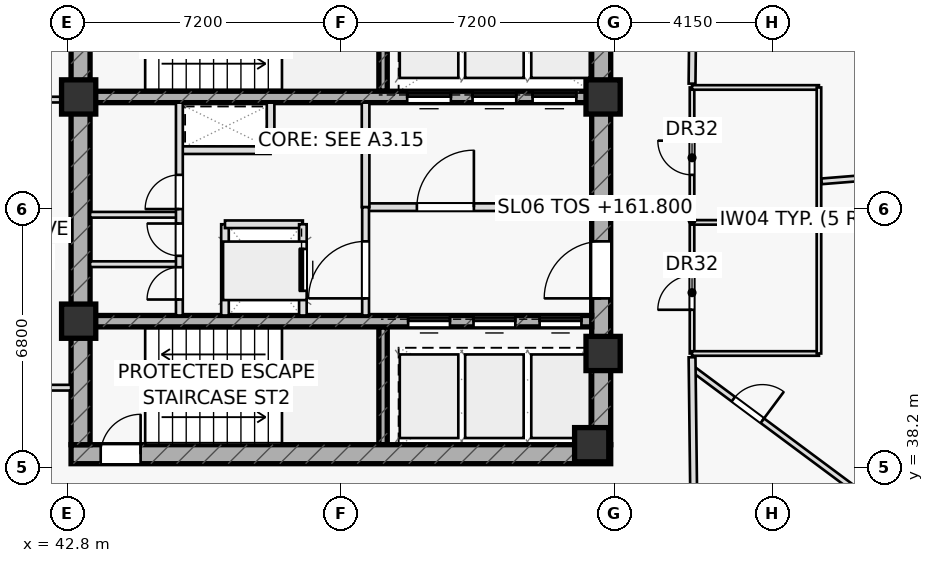
"""IFC4 building model, lengths in metres.
Left out: names, types, materials, properties, quantities, classifications, styles, units other than length and angle.
Written with IfcOpenShell. Run it as: python <this file> out.ifc"""

import sys

from ifc_helpers import new_model, si_unit, direction, frame, frame_2d, origin, origin_2d, place, context, subcontext, project, spatial, rectangle, extrude, element, fill, save


model = new_model("IFC4")
c1 = context("Model", 3, precision=1e-05, world=origin(), true_north=direction((0.0, 1.0)))
c2 = subcontext(c1, "Body", "Model", "MODEL_VIEW")
j1 = project(units=[si_unit("LENGTHUNIT", "METRE"), si_unit("PLANEANGLEUNIT", "RADIAN")], contexts=[c1])
p1 = place(None, origin())
s1 = spatial("IfcSite", under=j1, at=p1, CompositionType="ELEMENT")
p2 = place(p1, origin())
s2 = spatial("IfcBuilding", under=s1, at=p2, CompositionType="ELEMENT")
p3 = place(p2, frame((0.0, 0.0, 161.8)))
s3 = spatial("IfcBuildingStorey", under=s2, at=p3, CompositionType="ELEMENT", Elevation=161.8)
for number, where, z_axis, x_axis in (
    (1, (51.11, 48.1, 0.0), (0.0, 0.0, 1.0), (0.0, 1.0, 0.0)),
    (2, (51.11, 38.8, 0.0), (0.0, 0.0, 1.0), (0.0, 1.0, 0.0)),
):
    element("IfcWall", number, at=place(p3, frame(where, z_axis=z_axis, x_axis=x_axis)), inside=s3, PredefinedType="SHEAR", context=c2, shape_type="SweptSolid", body=[
        extrude(rectangle(XDim=3.1, YDim=0.22, at=frame_2d((1.55, 0.0))), origin(), (0.0, 0.0, 1.0), 3.55),
    ])
p4 = place(p3, frame((42.9, 38.55, 0.0), z_axis=(0.0, 0.0, 1.0), x_axis=(1.0, 0.0, 0.0)))
e3 = element("IfcWall", 3, at=p4, inside=s3, PredefinedType="SHEAR", context=c2, shape_type="SweptSolid", body=[
    extrude(rectangle(XDim=14.2, YDim=0.5, at=frame_2d((7.1, 0.0))), origin(), (0.0, 0.0, 1.0), 3.55),
])
p5 = place(p4, frame((0.78, 0.0, 0.0)))
e4 = element("IfcOpeningElement", 4, at=p5, cuts=e3, PredefinedType="OPENING", context=c2, shape_type="SweptSolid", body=[
    extrude(rectangle(XDim=1.05, YDim=2.2, at=frame_2d((0.525, 1.1))), frame((0.0, 0.26, 0.0), z_axis=(0.0, -1.0, 0.0), x_axis=(1.0, 0.0, 0.0)), (0.0, 0.0, 1.0), 0.52),
])
p6 = place(p3, frame((43.15, 38.8, 0.0), z_axis=(0.0, 0.0, 1.0), x_axis=(0.0, 1.0, 0.0)))
e5 = element("IfcWall", 5, at=p6, inside=s3, PredefinedType="SHEAR", context=c2, shape_type="SweptSolid", body=[
    extrude(rectangle(XDim=12.4, YDim=0.5, at=frame_2d((6.2, 0.0))), origin(), (0.0, 0.0, 1.0), 3.55),
])
p7 = place(p3, frame((56.85, 38.8, 0.0), z_axis=(0.0, 0.0, 1.0), x_axis=(0.0, 1.0, 0.0)))
e6 = element("IfcWall", 6, at=p7, inside=s3, PredefinedType="SHEAR", context=c2, shape_type="SweptSolid", body=[
    extrude(rectangle(XDim=12.4, YDim=0.5, at=frame_2d((6.2, 0.0))), origin(), (0.0, 0.0, 1.0), 3.55),
])
p8 = place(p7, frame((3.85, 0.0, 0.0)))
e7 = element("IfcOpeningElement", 7, at=p8, cuts=e6, PredefinedType="OPENING", context=c2, shape_type="SweptSolid", body=[
    extrude(rectangle(XDim=1.5, YDim=2.2, at=frame_2d((0.75, 1.1))), frame((0.0, 0.26, 0.0), z_axis=(0.0, -1.0, 0.0), x_axis=(1.0, 0.0, 0.0)), (0.0, 0.0, 1.0), 0.52),
])
p9 = place(p3, frame((43.4, 47.95, 0.0), z_axis=(0.0, 0.0, 1.0), x_axis=(1.0, 0.0, 0.0)))
e8 = element("IfcWall", 8, at=p9, inside=s3, PredefinedType="SHEAR", context=c2, shape_type="SweptSolid", body=[
    extrude(rectangle(XDim=13.2, YDim=0.3, at=frame_2d((6.6, 0.0))), origin(), (0.0, 0.0, 1.0), 3.55),
])
p10 = place(p9, frame((8.345, 0.0, 0.0)))
e9 = element("IfcOpeningElement", 9, at=p10, cuts=e8, PredefinedType="OPENING", context=c2, shape_type="SweptSolid", body=[
    extrude(rectangle(XDim=1.15, YDim=2.2, at=frame_2d((0.575, 1.1))), frame((0.0, 0.16, 0.0), z_axis=(0.0, -1.0, 0.0), x_axis=(1.0, 0.0, 0.0)), (0.0, 0.0, 1.0), 0.32),
])
p11 = place(p9, frame((10.065, 0.0, 0.0)))
e10 = element("IfcOpeningElement", 10, at=p11, cuts=e8, PredefinedType="OPENING", context=c2, shape_type="SweptSolid", body=[
    extrude(rectangle(XDim=1.15, YDim=2.2, at=frame_2d((0.575, 1.1))), frame((0.0, 0.16, 0.0), z_axis=(0.0, -1.0, 0.0), x_axis=(1.0, 0.0, 0.0)), (0.0, 0.0, 1.0), 0.32),
])
p12 = place(p9, frame((11.645, 0.0, 0.0)))
e11 = element("IfcOpeningElement", 11, at=p12, cuts=e8, PredefinedType="OPENING", context=c2, shape_type="SweptSolid", body=[
    extrude(rectangle(XDim=1.15, YDim=2.2, at=frame_2d((0.575, 1.1))), frame((0.0, 0.16, 0.0), z_axis=(0.0, -1.0, 0.0), x_axis=(1.0, 0.0, 0.0)), (0.0, 0.0, 1.0), 0.32),
])
p13 = place(p3, frame((43.4, 42.05, 0.0), z_axis=(0.0, 0.0, 1.0), x_axis=(1.0, 0.0, 0.0)))
e12 = element("IfcWall", 12, at=p13, inside=s3, PredefinedType="SHEAR", context=c2, shape_type="SweptSolid", body=[
    extrude(rectangle(XDim=13.2, YDim=0.3, at=frame_2d((6.6, 0.0))), origin(), (0.0, 0.0, 1.0), 3.55),
])
p14 = place(p13, frame((8.37, 0.0, 0.0)))
e13 = element("IfcOpeningElement", 13, at=p14, cuts=e12, PredefinedType="OPENING", context=c2, shape_type="SweptSolid", body=[
    extrude(rectangle(XDim=1.1, YDim=2.15, at=frame_2d((0.55, 1.075))), frame((0.0, 0.16, 0.0), z_axis=(0.0, -1.0, 0.0), x_axis=(1.0, 0.0, 0.0)), (0.0, 0.0, 1.0), 0.32),
])
p15 = place(p13, frame((10.09, 0.0, 0.0)))
e14 = element("IfcOpeningElement", 14, at=p15, cuts=e12, PredefinedType="OPENING", context=c2, shape_type="SweptSolid", body=[
    extrude(rectangle(XDim=1.1, YDim=2.15, at=frame_2d((0.55, 1.075))), frame((0.0, 0.16, 0.0), z_axis=(0.0, -1.0, 0.0), x_axis=(1.0, 0.0, 0.0)), (0.0, 0.0, 1.0), 0.32),
])
p16 = place(p13, frame((11.83, 0.0, 0.0)))
e15 = element("IfcOpeningElement", 15, at=p16, cuts=e12, PredefinedType="OPENING", context=c2, shape_type="SweptSolid", body=[
    extrude(rectangle(XDim=1.1, YDim=2.15, at=frame_2d((0.55, 1.075))), frame((0.0, 0.16, 0.0), z_axis=(0.0, -1.0, 0.0), x_axis=(1.0, 0.0, 0.0)), (0.0, 0.0, 1.0), 0.32),
])
for number, where, z_axis, x_axis in (
    (16, (43.1, 47.95, 0.0), (0.0, 0.0, 1.0), (1.0, 0.0, 0.0)),
    (17, (56.9, 47.95, 0.0), (0.0, 0.0, 1.0), (1.0, 0.0, 0.0)),
    (18, (43.1, 42.05, 0.0), (0.0, 0.0, 1.0), (1.0, 0.0, 0.0)),
    (19, (56.9, 41.2, 0.0), (0.0, 0.0, 1.0), (1.0, 0.0, 0.0)),
    (20, (56.6, 38.8, 0.0), (0.0, 0.0, 1.0), (1.0, 0.0, 0.0)),
):
    element("IfcColumn", number, at=place(p3, frame(where, z_axis=z_axis, x_axis=x_axis)), inside=s3, PredefinedType="COLUMN", context=c2, shape_type="SweptSolid", body=[
        extrude(rectangle(XDim=0.9, YDim=0.9, at=origin_2d()), origin(), (0.0, 0.0, 1.0), 3.55),
    ])
p17 = place(p3, frame((45.75, 46.55, 0.0), z_axis=(0.0, 0.0, 1.0), x_axis=(1.0, 0.0, 0.0)))
e21 = element("IfcWall", 21, at=p17, inside=s3, PredefinedType="PARTITIONING", context=c2, shape_type="SweptSolid", body=[
    extrude(rectangle(XDim=2.4, YDim=0.2, at=frame_2d((1.2, 0.0))), origin(), (0.0, 0.0, 1.0), 3.55),
])
p18 = place(p3, frame((48.15, 46.55, 0.0), z_axis=(0.0, 0.0, 1.0), x_axis=(0.0, 1.0, 0.0)))
e22 = element("IfcWall", 22, at=p18, inside=s3, PredefinedType="PARTITIONING", context=c2, shape_type="SweptSolid", body=[
    extrude(rectangle(XDim=1.25, YDim=0.2, at=frame_2d((0.625, 0.0))), origin(), (0.0, 0.0, 1.0), 3.55),
])
p19 = place(p3, frame((46.95, 42.2, 0.0), z_axis=(0.0, 0.0, 1.0), x_axis=(0.0, 1.0, 0.0)))
e23 = element("IfcWall", 23, at=p19, inside=s3, PredefinedType="PARTITIONING", context=c2, shape_type="SweptSolid", body=[
    extrude(rectangle(XDim=2.4, YDim=0.2, at=frame_2d((1.2, 0.0))), origin(), (0.0, 0.0, 1.0), 3.55),
])
p20 = place(p3, frame((46.95, 44.6, 0.0), z_axis=(0.0, 0.0, 1.0), x_axis=(1.0, 0.0, 0.0)))
e24 = element("IfcWall", 24, at=p20, inside=s3, PredefinedType="PARTITIONING", context=c2, shape_type="SweptSolid", body=[
    extrude(rectangle(XDim=2.05, YDim=0.2, at=frame_2d((1.025, 0.0))), origin(), (0.0, 0.0, 1.0), 3.55),
])
p21 = place(p3, frame((50.65, 45.05, 0.0), z_axis=(0.0, 0.0, 1.0), x_axis=(1.0, 0.0, 0.0)))
e25 = element("IfcWall", 25, at=p21, inside=s3, PredefinedType="PARTITIONING", context=c2, shape_type="SweptSolid", body=[
    extrude(rectangle(XDim=5.95, YDim=0.2, at=frame_2d((2.975, 0.0))), origin(), (0.0, 0.0, 1.0), 3.55),
])
p22 = place(p21, frame((1.35, 0.0, 0.0)))
e26 = element("IfcOpeningElement", 26, at=p22, cuts=e25, PredefinedType="OPENING", context=c2, shape_type="SweptSolid", body=[
    extrude(rectangle(XDim=1.5, YDim=2.2, at=frame_2d((0.75, 1.1))), frame((0.0, 0.11, 0.0), z_axis=(0.0, -1.0, 0.0), x_axis=(1.0, 0.0, 0.0)), (0.0, 0.0, 1.0), 0.22),
])
p23 = place(p3, frame((50.65, 45.05, 0.0), z_axis=(0.0, 0.0, 1.0), x_axis=(0.0, 1.0, 0.0)))
e27 = element("IfcWall", 27, at=p23, inside=s3, PredefinedType="PARTITIONING", context=c2, shape_type="SweptSolid", body=[
    extrude(rectangle(XDim=2.75, YDim=0.2, at=frame_2d((1.375, 0.0))), origin(), (0.0, 0.0, 1.0), 3.55),
])
p24 = place(p3, frame((50.65, 42.2, 0.0), z_axis=(0.0, 0.0, 1.0), x_axis=(0.0, 1.0, 0.0)))
e28 = element("IfcWall", 28, at=p24, inside=s3, PredefinedType="PARTITIONING", context=c2, shape_type="SweptSolid", body=[
    extrude(rectangle(XDim=2.85, YDim=0.18, at=frame_2d((1.425, 0.0))), origin(), (0.0, 0.0, 1.0), 3.55),
])
p25 = place(p24, frame((0.45, 0.0, 0.0)))
e29 = element("IfcOpeningElement", 29, at=p25, cuts=e28, PredefinedType="OPENING", context=c2, shape_type="SweptSolid", body=[
    extrude(rectangle(XDim=1.5, YDim=2.2, at=frame_2d((0.75, 1.1))), frame((0.0, 0.1, 0.0), z_axis=(0.0, -1.0, 0.0), x_axis=(1.0, 0.0, 0.0)), (0.0, 0.0, 1.0), 0.2),
])
for number, where, z_axis, x_axis in (
    (30, (43.4, 43.55, 0.0), (0.0, 0.0, 1.0), (1.0, 0.0, 0.0)),
    (31, (43.4, 44.85, 0.0), (0.0, 0.0, 1.0), (1.0, 0.0, 0.0)),
):
    element("IfcWall", number, at=place(p3, frame(where, z_axis=z_axis, x_axis=x_axis)), inside=s3, PredefinedType="PARTITIONING", context=c2, shape_type="SweptSolid", body=[
        extrude(rectangle(XDim=2.35, YDim=0.15, at=frame_2d((1.175, 0.0))), origin(), (0.0, 0.0, 1.0), 3.55),
    ])
p26 = place(p3, frame((45.75, 42.2, 0.0), z_axis=(0.0, 0.0, 1.0), x_axis=(0.0, 1.0, 0.0)))
e32 = element("IfcWall", 32, at=p26, inside=s3, PredefinedType="PARTITIONING", context=c2, shape_type="SweptSolid", body=[
    extrude(rectangle(XDim=5.6, YDim=0.18, at=frame_2d((2.8, 0.0))), origin(), (0.0, 0.0, 1.0), 3.55),
])
p27 = place(p26, frame((0.42, 0.0, 0.0)))
e33 = element("IfcOpeningElement", 33, at=p27, cuts=e32, PredefinedType="OPENING", context=c2, shape_type="SweptSolid", body=[
    extrude(rectangle(XDim=0.85, YDim=2.05, at=frame_2d((0.425, 1.025))), frame((0.0, 0.1, 0.0), z_axis=(0.0, -1.0, 0.0), x_axis=(1.0, 0.0, 0.0)), (0.0, 0.0, 1.0), 0.2),
])
p28 = place(p26, frame((1.57, 0.0, 0.0)))
e34 = element("IfcOpeningElement", 34, at=p28, cuts=e32, PredefinedType="OPENING", context=c2, shape_type="SweptSolid", body=[
    extrude(rectangle(XDim=0.85, YDim=2.05, at=frame_2d((0.425, 1.025))), frame((0.0, 0.1, 0.0), z_axis=(0.0, -1.0, 0.0), x_axis=(1.0, 0.0, 0.0)), (0.0, 0.0, 1.0), 0.2),
])
p29 = place(p26, frame((2.8, 0.0, 0.0)))
e35 = element("IfcOpeningElement", 35, at=p29, cuts=e32, PredefinedType="OPENING", context=c2, shape_type="SweptSolid", body=[
    extrude(rectangle(XDim=0.9, YDim=2.05, at=frame_2d((0.45, 1.025))), frame((0.0, 0.1, 0.0), z_axis=(0.0, -1.0, 0.0), x_axis=(1.0, 0.0, 0.0)), (0.0, 0.0, 1.0), 0.2),
])
p30 = place(p3, frame((37.14, 40.3, 0.0), z_axis=(0.0, 0.0, 1.0), x_axis=(1.0, 0.0, 0.0)))
e36 = element("IfcWall", 36, at=p30, inside=s3, PredefinedType="PARTITIONING", context=c2, shape_type="SweptSolid", body=[
    extrude(rectangle(XDim=5.76, YDim=0.15, at=frame_2d((2.88, 0.0))), origin(), (0.0, 0.0, 1.0), 3.55),
])
p31 = place(p30, frame((3.21, 0.0, 0.0)))
e37 = element("IfcOpeningElement", 37, at=p31, cuts=e36, PredefinedType="OPENING", context=c2, shape_type="SweptSolid", body=[
    extrude(rectangle(XDim=0.95, YDim=2.05, at=frame_2d((0.475, 1.025))), frame((0.0, 0.085, 0.0), z_axis=(0.0, -1.0, 0.0), x_axis=(1.0, 0.0, 0.0)), (0.0, 0.0, 1.0), 0.17),
])
p32 = place(p3, frame((37.14, 47.88, 0.0), z_axis=(0.0, 0.0, 1.0), x_axis=(1.0, 0.0, 0.0)))
e38 = element("IfcWall", 38, at=p32, inside=s3, PredefinedType="PARTITIONING", context=c2, shape_type="SweptSolid", body=[
    extrude(rectangle(XDim=5.76, YDim=0.15, at=frame_2d((2.88, 0.0))), origin(), (0.0, 0.0, 1.0), 2.935),
])
p33 = place(p3, frame((59.24, 41.2, 0.0), z_axis=(0.0, 0.0, 1.0), x_axis=(0.0, 1.0, 0.0)))
e39 = element("IfcWall", 39, at=p33, inside=s3, PredefinedType="PARTITIONING", context=c2, shape_type="SweptSolid", body=[
    extrude(rectangle(XDim=7.0, YDim=0.12, at=frame_2d((3.5, 0.0))), origin(), (0.0, 0.0, 1.0), 3.55),
])
p34 = place(p33, frame((1.15, 0.0, 0.0)))
e40 = element("IfcOpeningElement", 40, at=p34, cuts=e39, PredefinedType="OPENING", context=c2, shape_type="SweptSolid", body=[
    extrude(rectangle(XDim=0.9, YDim=2.05, at=frame_2d((0.45, 1.025))), frame((0.0, 0.07, 0.0), z_axis=(0.0, -1.0, 0.0), x_axis=(1.0, 0.0, 0.0)), (0.0, 0.0, 1.0), 0.14),
])
p35 = place(p33, frame((4.7, 0.0, 0.0)))
e41 = element("IfcOpeningElement", 41, at=p35, cuts=e39, PredefinedType="OPENING", context=c2, shape_type="SweptSolid", body=[
    extrude(rectangle(XDim=0.9, YDim=2.05, at=frame_2d((0.45, 1.025))), frame((0.0, 0.07, 0.0), z_axis=(0.0, -1.0, 0.0), x_axis=(1.0, 0.0, 0.0)), (0.0, 0.0, 1.0), 0.14),
])
for number, where, z_axis, x_axis in (
    (42, (59.24, 41.2, 0.0), (0.0, 0.0, 1.0), (1.0, 0.0, 0.0)),
    (43, (59.24, 44.65, 0.0), (0.0, 0.0, 1.0), (1.0, 0.0, 0.0)),
    (44, (59.24, 48.2, 0.0), (0.0, 0.0, 1.0), (1.0, 0.0, 0.0)),
):
    element("IfcWall", number, at=place(p3, frame(where, z_axis=z_axis, x_axis=x_axis)), inside=s3, PredefinedType="PARTITIONING", context=c2, shape_type="SweptSolid", body=[
        extrude(rectangle(XDim=3.34, YDim=0.12, at=frame_2d((1.67, 0.0))), origin(), (0.0, 0.0, 1.0), 3.55),
    ])
p36 = place(p3, frame((62.58, 41.2, 0.0), z_axis=(0.0, 0.0, 1.0), x_axis=(0.0, 1.0, 0.0)))
e45 = element("IfcWall", 45, at=p36, inside=s3, PredefinedType="PARTITIONING", context=c2, shape_type="SweptSolid", body=[
    extrude(rectangle(XDim=7.0, YDim=0.12, at=frame_2d((3.5, 0.0))), origin(), (0.0, 0.0, 1.0), 3.55),
])
p37 = place(p3, frame((59.244, 40.804, 0.0), z_axis=(0.0, 0.0, 1.0), x_axis=(0.802525033697, -0.596618446152, 0.0)))
e46 = element("IfcWall", 46, at=p37, inside=s3, PredefinedType="PARTITIONING", context=c2, shape_type="SweptSolid", body=[
    extrude(rectangle(XDim=16.637, YDim=0.15, at=frame_2d((8.319, 0.0))), origin(), (0.0, 0.0, 1.0), 2.935),
])
p38 = place(p37, frame((1.35, 0.0, 0.0)))
e47 = element("IfcOpeningElement", 47, at=p38, cuts=e46, PredefinedType="OPENING", context=c2, shape_type="SweptSolid", body=[
    extrude(rectangle(XDim=0.95, YDim=2.05, at=frame_2d((0.475, 1.025))), frame((0.0, 0.085, 0.0), z_axis=(0.0, -1.0, 0.0), x_axis=(1.0, 0.0, 0.0)), (0.0, 0.0, 1.0), 0.17),
])
p39 = place(p3, frame((62.65, 45.729, 0.0), z_axis=(0.0, 0.0, 1.0), x_axis=(0.99676638327, 0.08035407384, 0.0)))
e48 = element("IfcWall", 48, at=p39, inside=s3, PredefinedType="PARTITIONING", context=c2, shape_type="SweptSolid", body=[
    extrude(rectangle(XDim=19.746, YDim=0.15, at=frame_2d((9.873, 0.0))), origin(), (0.0, 0.0, 1.0), 3.025),
])
p40 = place(p3, frame((59.301, 53.95, 0.0), z_axis=(0.0, 0.0, 1.0), x_axis=(-0.010629422803, -0.99994350609, 0.0)))
e49 = element("IfcWall", 49, at=p40, inside=s3, PredefinedType="PARTITIONING", context=c2, shape_type="SweptSolid", body=[
    extrude(rectangle(XDim=5.65, YDim=0.18, at=frame_2d((2.825, 0.0))), origin(), (0.0, 0.0, 1.0), 2.935),
])
p41 = place(p40, frame((2.35, 0.0, 0.0)))
e50 = element("IfcOpeningElement", 50, at=p41, cuts=e49, PredefinedType="OPENING", context=c2, shape_type="SweptSolid", body=[
    extrude(rectangle(XDim=0.95, YDim=2.05, at=frame_2d((0.475, 1.025))), frame((0.0, 0.1, 0.0), z_axis=(0.0, -1.0, 0.0), x_axis=(1.0, 0.0, 0.0)), (0.0, 0.0, 1.0), 0.2),
])
p42 = place(p3, frame((59.24, 41.1, 0.0), z_axis=(0.0, 0.0, 1.0), x_axis=(0.011891834917, -0.999929289631, 0.0)))
e51 = element("IfcWall", 51, at=p42, inside=s3, PredefinedType="PARTITIONING", context=c2, shape_type="SweptSolid", body=[
    extrude(rectangle(XDim=5.05, YDim=0.18, at=frame_2d((2.525, 0.0))), origin(), (0.0, 0.0, 1.0), 2.935),
])
p43 = place(p3, frame((49.0, 42.2, 0.0), z_axis=(0.0, 0.0, 1.0), x_axis=(0.0, 1.0, 0.0)))
e52 = element("IfcWall", 52, at=p43, inside=s3, PredefinedType="PARTITIONING", context=c2, shape_type="SweptSolid", body=[
    extrude(rectangle(XDim=2.4, YDim=0.2, at=frame_2d((1.2, 0.0))), origin(), (0.0, 0.0, 1.0), 3.55),
])
p44 = place(p43, frame((0.65, 0.0, 0.0)))
e53 = element("IfcOpeningElement", 53, at=p44, cuts=e52, PredefinedType="OPENING", context=c2, shape_type="SweptSolid", body=[
    extrude(rectangle(XDim=1.1, YDim=2.15, at=frame_2d((0.55, 1.075))), frame((0.0, 0.11, 0.0), z_axis=(0.0, -1.0, 0.0), x_axis=(1.0, 0.0, 0.0)), (0.0, 0.0, 1.0), 0.22),
])
p45 = place(p5, origin())
e54 = element("IfcDoor", 54, at=p45, inside=s3, OperationType="SINGLE_SWING_RIGHT", PredefinedType="DOOR", context=c2, shape_type="SweptSolid", body=[
    extrude(rectangle(XDim=1.05, YDim=2.2, at=frame_2d((0.525, 1.1))), frame((0.0, 0.025, 0.0), z_axis=(0.0, -1.0, 0.0), x_axis=(1.0, 0.0, 0.0)), (0.0, 0.0, 1.0), 0.05),
])
fill(e4, e54)
p46 = place(p8, origin())
e55 = element("IfcDoor", 55, at=p46, inside=s3, OperationType="SINGLE_SWING_LEFT", PredefinedType="DOOR", context=c2, shape_type="SweptSolid", body=[
    extrude(rectangle(XDim=1.5, YDim=2.2, at=frame_2d((0.75, 1.1))), frame((0.0, 0.025, 0.0), z_axis=(0.0, -1.0, 0.0), x_axis=(1.0, 0.0, 0.0)), (0.0, 0.0, 1.0), 0.05),
])
fill(e7, e55)
p47 = place(p22, origin())
e56 = element("IfcDoor", 56, at=p47, inside=s3, OperationType="SINGLE_SWING_RIGHT", PredefinedType="DOOR", context=c2, shape_type="SweptSolid", body=[
    extrude(rectangle(XDim=1.5, YDim=2.2, at=frame_2d((0.75, 1.1))), frame((0.0, 0.025, 0.0), z_axis=(0.0, -1.0, 0.0), x_axis=(1.0, 0.0, 0.0)), (0.0, 0.0, 1.0), 0.05),
])
fill(e26, e56)
p48 = place(p25, origin())
e57 = element("IfcDoor", 57, at=p48, inside=s3, OperationType="SINGLE_SWING_LEFT", PredefinedType="DOOR", context=c2, shape_type="SweptSolid", body=[
    extrude(rectangle(XDim=1.5, YDim=2.2, at=frame_2d((0.75, 1.1))), frame((0.0, 0.025, 0.0), z_axis=(0.0, -1.0, 0.0), x_axis=(1.0, 0.0, 0.0)), (0.0, 0.0, 1.0), 0.05),
])
fill(e29, e57)
p49 = place(p27, origin())
e58 = element("IfcDoor", 58, at=p49, inside=s3, OperationType="SINGLE_SWING_LEFT", PredefinedType="DOOR", context=c2, shape_type="SweptSolid", body=[
    extrude(rectangle(XDim=0.85, YDim=2.05, at=frame_2d((0.425, 1.025))), frame((0.0, 0.025, 0.0), z_axis=(0.0, -1.0, 0.0), x_axis=(1.0, 0.0, 0.0)), (0.0, 0.0, 1.0), 0.05),
])
fill(e33, e58)
p50 = place(p28, origin())
e59 = element("IfcDoor", 59, at=p50, inside=s3, OperationType="SINGLE_SWING_RIGHT", PredefinedType="DOOR", context=c2, shape_type="SweptSolid", body=[
    extrude(rectangle(XDim=0.85, YDim=2.05, at=frame_2d((0.425, 1.025))), frame((0.0, 0.025, 0.0), z_axis=(0.0, -1.0, 0.0), x_axis=(1.0, 0.0, 0.0)), (0.0, 0.0, 1.0), 0.05),
])
fill(e34, e59)
p51 = place(p29, origin())
e60 = element("IfcDoor", 60, at=p51, inside=s3, OperationType="SINGLE_SWING_LEFT", PredefinedType="DOOR", context=c2, shape_type="SweptSolid", body=[
    extrude(rectangle(XDim=0.9, YDim=2.05, at=frame_2d((0.45, 1.025))), frame((0.0, 0.025, 0.0), z_axis=(0.0, -1.0, 0.0), x_axis=(1.0, 0.0, 0.0)), (0.0, 0.0, 1.0), 0.05),
])
fill(e35, e60)
p52 = place(p34, origin())
e61 = element("IfcDoor", 61, at=p52, inside=s3, OperationType="SINGLE_SWING_LEFT", PredefinedType="DOOR", context=c2, shape_type="SweptSolid", body=[
    extrude(rectangle(XDim=0.9, YDim=2.05, at=frame_2d((0.45, 1.025))), frame((0.0, 0.025, 0.0), z_axis=(0.0, -1.0, 0.0), x_axis=(1.0, 0.0, 0.0)), (0.0, 0.0, 1.0), 0.05),
])
fill(e40, e61)
p53 = place(p35, origin())
e62 = element("IfcDoor", 62, at=p53, inside=s3, OperationType="SINGLE_SWING_RIGHT", PredefinedType="DOOR", context=c2, shape_type="SweptSolid", body=[
    extrude(rectangle(XDim=0.9, YDim=2.05, at=frame_2d((0.45, 1.025))), frame((0.0, 0.025, 0.0), z_axis=(0.0, -1.0, 0.0), x_axis=(1.0, 0.0, 0.0)), (0.0, 0.0, 1.0), 0.05),
])
fill(e41, e62)
p54 = place(p38, origin())
e63 = element("IfcDoor", 63, at=p54, inside=s3, OperationType="SINGLE_SWING_RIGHT", PredefinedType="DOOR", context=c2, shape_type="SweptSolid", body=[
    extrude(rectangle(XDim=0.95, YDim=2.05, at=frame_2d((0.475, 1.025))), frame((0.0, 0.025, 0.0), z_axis=(0.0, -1.0, 0.0), x_axis=(1.0, 0.0, 0.0)), (0.0, 0.0, 1.0), 0.05),
])
fill(e47, e63)
p55 = place(p10, origin())
e64 = element("IfcDoor", 64, at=p55, inside=s3, OperationType="SLIDING_TO_LEFT", PredefinedType="DOOR", context=c2, shape_type="SweptSolid", body=[
    extrude(rectangle(XDim=1.15, YDim=2.2, at=frame_2d((0.575, 1.1))), frame((0.0, 0.025, 0.0), z_axis=(0.0, -1.0, 0.0), x_axis=(1.0, 0.0, 0.0)), (0.0, 0.0, 1.0), 0.05),
])
fill(e9, e64)
p56 = place(p11, origin())
e65 = element("IfcDoor", 65, at=p56, inside=s3, OperationType="SLIDING_TO_LEFT", PredefinedType="DOOR", context=c2, shape_type="SweptSolid", body=[
    extrude(rectangle(XDim=1.15, YDim=2.2, at=frame_2d((0.575, 1.1))), frame((0.0, 0.025, 0.0), z_axis=(0.0, -1.0, 0.0), x_axis=(1.0, 0.0, 0.0)), (0.0, 0.0, 1.0), 0.05),
])
fill(e10, e65)
p57 = place(p12, origin())
e66 = element("IfcDoor", 66, at=p57, inside=s3, OperationType="SLIDING_TO_LEFT", PredefinedType="DOOR", context=c2, shape_type="SweptSolid", body=[
    extrude(rectangle(XDim=1.15, YDim=2.2, at=frame_2d((0.575, 1.1))), frame((0.0, 0.025, 0.0), z_axis=(0.0, -1.0, 0.0), x_axis=(1.0, 0.0, 0.0)), (0.0, 0.0, 1.0), 0.05),
])
fill(e11, e66)
p58 = place(p14, origin())
e67 = element("IfcDoor", 67, at=p58, inside=s3, OperationType="SLIDING_TO_LEFT", PredefinedType="DOOR", context=c2, shape_type="SweptSolid", body=[
    extrude(rectangle(XDim=1.1, YDim=2.15, at=frame_2d((0.55, 1.075))), frame((0.0, 0.025, 0.0), z_axis=(0.0, -1.0, 0.0), x_axis=(1.0, 0.0, 0.0)), (0.0, 0.0, 1.0), 0.05),
])
fill(e13, e67)
p59 = place(p15, origin())
e68 = element("IfcDoor", 68, at=p59, inside=s3, OperationType="SLIDING_TO_LEFT", PredefinedType="DOOR", context=c2, shape_type="SweptSolid", body=[
    extrude(rectangle(XDim=1.1, YDim=2.15, at=frame_2d((0.55, 1.075))), frame((0.0, 0.025, 0.0), z_axis=(0.0, -1.0, 0.0), x_axis=(1.0, 0.0, 0.0)), (0.0, 0.0, 1.0), 0.05),
])
fill(e14, e68)
p60 = place(p16, origin())
e69 = element("IfcDoor", 69, at=p60, inside=s3, OperationType="SLIDING_TO_LEFT", PredefinedType="DOOR", context=c2, shape_type="SweptSolid", body=[
    extrude(rectangle(XDim=1.1, YDim=2.15, at=frame_2d((0.55, 1.075))), frame((0.0, 0.025, 0.0), z_axis=(0.0, -1.0, 0.0), x_axis=(1.0, 0.0, 0.0)), (0.0, 0.0, 1.0), 0.05),
])
fill(e15, e69)
p61 = place(p44, origin())
e70 = element("IfcDoor", 70, at=p61, inside=s3, OperationType="SLIDING_TO_RIGHT", PredefinedType="DOOR", context=c2, shape_type="SweptSolid", body=[
    extrude(rectangle(XDim=1.1, YDim=2.15, at=frame_2d((0.55, 1.075))), frame((0.0, 0.025, 0.0), z_axis=(0.0, -1.0, 0.0), x_axis=(1.0, 0.0, 0.0)), (0.0, 0.0, 1.0), 0.05),
])
fill(e53, e70)
save(model, sys.argv[1])
